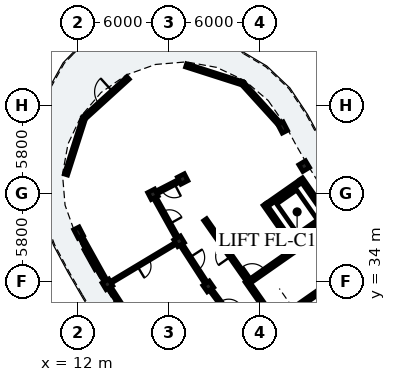
"""IFC4 building model, lengths in metres.
Left out: names, types, materials, properties, quantities, classifications, styles, units other than length and angle.
Written with IfcOpenShell. Run it as: python <this file> out.ifc"""

import sys

from ifc_helpers import new_model, si_unit, direction, frame, frame_2d, origin, origin_2d, place, context, subcontext, project, spatial, rectangle, extrude, element, fill, save


model = new_model("IFC4")
c1 = context("Model", 3, precision=1e-05, world=origin(), true_north=direction((0.0, 1.0)))
c2 = subcontext(c1, "Body", "Model", "MODEL_VIEW")
j1 = project(units=[si_unit("LENGTHUNIT", "METRE"), si_unit("PLANEANGLEUNIT", "RADIAN")], contexts=[c1])
p1 = place(None, origin())
s1 = spatial("IfcSite", under=j1, at=p1, CompositionType="ELEMENT")
p2 = place(p1, origin())
s2 = spatial("IfcBuilding", under=s1, at=p2, CompositionType="ELEMENT")
p3 = place(p2, frame((0.0, 0.0, 35.72)))
s3 = spatial("IfcBuildingStorey", under=s2, at=p3, CompositionType="ELEMENT", Elevation=35.72)
p4 = place(p3, frame((25.114, 31.414, 0.0), z_axis=(0.0, 0.0, 1.0), x_axis=(0.819141541656, 0.573591435374, 0.0)))
e1 = element("IfcWall", 1, at=p4, inside=s3, PredefinedType="SHEAR", context=c2, shape_type="SweptSolid", body=[
    extrude(rectangle(XDim=6.6, YDim=0.25, at=frame_2d((3.3, 0.0))), origin(), (0.0, 0.0, 1.0), 3.11),
])
p5 = place(p3, frame((25.083, 31.24, 0.0), z_axis=(0.0, 0.0, 1.0), x_axis=(-0.573582112484, 0.819148069789, 0.0)))
e2 = element("IfcWall", 2, at=p5, inside=s3, PredefinedType="SHEAR", context=c2, shape_type="SweptSolid", body=[
    extrude(rectangle(XDim=3.42, YDim=0.25, at=frame_2d((1.71, 0.0))), origin(), (0.0, 0.0, 1.0), 3.11),
])
p6 = place(p3, frame((23.296, 34.01, 0.0), z_axis=(0.0, 0.0, 1.0), x_axis=(0.819153711596, 0.573574055182, 0.0)))
e3 = element("IfcWall", 3, at=p6, inside=s3, PredefinedType="SHEAR", context=c2, shape_type="SweptSolid", body=[
    extrude(rectangle(XDim=6.6, YDim=0.25, at=frame_2d((3.3, 0.0))), origin(), (0.0, 0.0, 1.0), 3.11),
])
p7 = place(p6, frame((0.22, 0.0, 0.0)))
e4 = element("IfcOpeningElement", 4, at=p7, cuts=e3, PredefinedType="OPENING", context=c2, shape_type="SweptSolid", body=[
    extrude(rectangle(XDim=1.05, YDim=2.15, at=frame_2d((0.525, 1.075))), frame((0.0, 0.135, 0.0), z_axis=(0.0, -1.0, 0.0), x_axis=(1.0, 0.0, 0.0)), (0.0, 0.0, 1.0), 0.27),
])
p8 = place(p3, frame((26.169, 36.419, 0.0), z_axis=(0.0, 0.0, 1.0), x_axis=(-0.573582966431, 0.819147471839, 0.0)))
e5 = element("IfcWall", 5, at=p8, inside=s3, PredefinedType="SHEAR", context=c2, shape_type="SweptSolid", body=[
    extrude(rectangle(XDim=3.26, YDim=0.23, at=frame_2d((1.63, 0.0))), origin(), (0.0, 0.0, 1.0), 3.11),
])
p9 = place(p8, frame((0.9, 0.0, 0.0)))
e6 = element("IfcOpeningElement", 6, at=p9, cuts=e5, PredefinedType="OPENING", context=c2, shape_type="SweptSolid", body=[
    extrude(rectangle(XDim=1.1, YDim=2.15, at=frame_2d((0.55, 1.075))), frame((0.0, 0.125, 0.0), z_axis=(0.0, -1.0, 0.0), x_axis=(1.0, 0.0, 0.0)), (0.0, 0.0, 1.0), 0.25),
])
p10 = place(p3, frame((28.569, 38.1, 0.0), z_axis=(0.0, 0.0, 1.0), x_axis=(-0.573582966431, 0.819147471839, 0.0)))
e7 = element("IfcWall", 7, at=p10, inside=s3, PredefinedType="SHEAR", context=c2, shape_type="SweptSolid", body=[
    extrude(rectangle(XDim=3.26, YDim=0.23, at=frame_2d((1.63, 0.0))), origin(), (0.0, 0.0, 1.0), 3.11),
])
p11 = place(p3, frame((26.197, 36.579, 0.0), z_axis=(0.0, 0.0, 1.0), x_axis=(0.819159695432, 0.573565509231, 0.0)))
e8 = element("IfcWall", 8, at=p11, inside=s3, PredefinedType="SHEAR", context=c2, shape_type="SweptSolid", body=[
    extrude(rectangle(XDim=2.7, YDim=0.23, at=frame_2d((1.35, 0.0))), origin(), (0.0, 0.0, 1.0), 3.11),
])
p12 = place(p3, frame((24.459, 39.061, 0.0), z_axis=(0.0, 0.0, 1.0), x_axis=(0.819189439894, 0.573523026186, 0.0)))
e9 = element("IfcWall", 9, at=p12, inside=s3, PredefinedType="SHEAR", context=c2, shape_type="SweptSolid", body=[
    extrude(rectangle(XDim=2.7, YDim=0.23, at=frame_2d((1.35, 0.0))), origin(), (0.0, 0.0, 1.0), 3.11),
])
p13 = place(p3, frame((25.483, 44.147, 0.0), z_axis=(0.0, 0.0, 1.0), x_axis=(-0.889017141486, -0.457873915117, 0.0)))
e10 = element("IfcColumn", 10, at=p13, inside=s3, PredefinedType="PILASTER", context=c2, shape_type="SweptSolid", body=[
    extrude(rectangle(XDim=0.39, YDim=0.63, at=origin_2d()), origin(), (0.0, 0.0, 1.0), 3.125),
])
for number, where, z_axis, x_axis in (
    (11, (18.905, 40.759, 0.0), (0.0, 0.0, 1.0), (-0.889, -0.458, 0.0)),
    (12, (16.949, 39.752, 0.0), (0.0, 0.0, 1.0), (-0.889, -0.458, 0.0)),
):
    element("IfcColumn", number, at=place(p3, frame(where, z_axis=z_axis, x_axis=x_axis)), inside=s3, PredefinedType="COLUMN", context=c2, shape_type="SweptSolid", body=[
        extrude(rectangle(XDim=0.51, YDim=0.51, at=origin_2d()), origin(), (0.0, 0.0, 1.0), 3.125),
    ])
p14 = place(p3, frame((12.059, 37.234, 0.0), z_axis=(0.0, 0.0, 1.0), x_axis=(-0.889017141486, -0.457873915117, 0.0)))
e13 = element("IfcColumn", 13, at=p14, inside=s3, PredefinedType="PILASTER", context=c2, shape_type="SweptSolid", body=[
    extrude(rectangle(XDim=0.39, YDim=0.63, at=origin_2d()), origin(), (0.0, 0.0, 1.0), 3.125),
])
for number, where, z_axis, x_axis in (
    (14, (26.899, 41.606, 0.0), (0.0, 0.0, 1.0), (-0.857, -0.515, 0.0)),
    (15, (18.67, 36.662, 0.0), (0.0, 0.0, 1.0), (-0.857, -0.515, 0.0)),
    (16, (13.956, 33.83, 0.0), (0.0, 0.0, 1.0), (-0.857, -0.515, 0.0)),
    (17, (20.59, 33.692, 0.0), (0.0, 0.0, 1.0), (-0.822, -0.57, 0.0)),
):
    element("IfcColumn", number, at=place(p3, frame(where, z_axis=z_axis, x_axis=x_axis)), inside=s3, PredefinedType="COLUMN", context=c2, shape_type="SweptSolid", body=[
        extrude(rectangle(XDim=0.51, YDim=0.51, at=origin_2d()), origin(), (0.0, 0.0, 1.0), 3.125),
    ])
p15 = place(p3, frame((12.139, 37.089, 0.0), z_axis=(0.0, 0.0, 1.0), x_axis=(0.486730241133, -0.873552329495, 0.0)))
e18 = element("IfcWall", 18, at=p15, inside=s3, PredefinedType="SOLIDWALL", context=c2, shape_type="SweptSolid", body=[
    extrude(rectangle(XDim=3.507, YDim=0.22, at=frame_2d((1.753, 0.0))), origin(), (0.0, 0.0, 1.0), 2.355),
])
p16 = place(p15, frame((0.993, 0.0, 0.55)))
e19 = element("IfcOpeningElement", 19, at=p16, cuts=e18, PredefinedType="OPENING", context=c2, shape_type="SweptSolid", body=[
    extrude(rectangle(XDim=1.52, YDim=1.485, at=frame_2d((0.76, 0.743))), frame((0.0, 0.12, 0.0), z_axis=(0.0, -1.0, 0.0), x_axis=(1.0, 0.0, 0.0)), (0.0, 0.0, 1.0), 0.24),
])
p17 = place(p3, frame((14.078, 33.641, 0.0), z_axis=(0.0, 0.0, 1.0), x_axis=(0.542803784415, -0.839859542796, 0.0)))
e20 = element("IfcWall", 20, at=p17, inside=s3, PredefinedType="SOLIDWALL", context=c2, shape_type="SweptSolid", body=[
    extrude(rectangle(XDim=3.507, YDim=0.22, at=frame_2d((1.753, 0.0))), origin(), (0.0, 0.0, 1.0), 2.355),
])
p18 = place(p17, frame((0.933, 0.0, 0.55)))
e21 = element("IfcOpeningElement", 21, at=p18, cuts=e20, PredefinedType="OPENING", context=c2, shape_type="SweptSolid", body=[
    extrude(rectangle(XDim=1.64, YDim=1.56, at=frame_2d((0.82, 0.78))), frame((0.0, 0.12, 0.0), z_axis=(0.0, -1.0, 0.0), x_axis=(1.0, 0.0, 0.0)), (0.0, 0.0, 1.0), 0.24),
])
p19 = place(p3, frame((11.23, 41.053, 0.0), z_axis=(0.0, 0.0, 1.0), x_axis=(0.304848259057, 0.95240093393, 0.0)))
e22 = element("IfcWall", 22, at=p19, inside=s3, PredefinedType="SOLIDWALL", context=c2, shape_type="SweptSolid", body=[
    extrude(rectangle(XDim=3.908, YDim=0.22, at=frame_2d((1.954, 0.0))), origin(), (0.0, 0.0, 1.0), 2.355),
])
p20 = place(p19, frame((1.029, 0.0, 0.4)))
e23 = element("IfcOpeningElement", 23, at=p20, cuts=e22, PredefinedType="OPENING", context=c2, shape_type="SweptSolid", body=[
    extrude(rectangle(XDim=1.85, YDim=1.72, at=frame_2d((0.925, 0.86))), frame((0.0, 0.12, 0.0), z_axis=(0.0, -1.0, 0.0), x_axis=(1.0, 0.0, 0.0)), (0.0, 0.0, 1.0), 0.24),
])
p21 = place(p3, frame((12.421, 44.775, 0.0), z_axis=(0.0, 0.0, 1.0), x_axis=(0.740242444111, 0.672340035947, 0.0)))
e24 = element("IfcWall", 24, at=p21, inside=s3, PredefinedType="SOLIDWALL", context=c2, shape_type="SweptSolid", body=[
    extrude(rectangle(XDim=3.908, YDim=0.22, at=frame_2d((1.954, 0.0))), origin(), (0.0, 0.0, 1.0), 2.355),
])
p22 = place(p21, frame((1.354, 0.0, 0.0)))
e25 = element("IfcOpeningElement", 25, at=p22, cuts=e24, PredefinedType="OPENING", context=c2, shape_type="SweptSolid", body=[
    extrude(rectangle(XDim=1.2, YDim=2.15, at=frame_2d((0.6, 1.075))), frame((0.0, 0.12, 0.0), z_axis=(0.0, -1.0, 0.0), x_axis=(1.0, 0.0, 0.0)), (0.0, 0.0, 1.0), 0.24),
])
p23 = place(p3, frame((19.133, 48.232, 0.0), z_axis=(0.0, 0.0, 1.0), x_axis=(0.952382795507, -0.304904920954, 0.0)))
e26 = element("IfcWall", 26, at=p23, inside=s3, PredefinedType="SOLIDWALL", context=c2, shape_type="SweptSolid", body=[
    extrude(rectangle(XDim=3.908, YDim=0.22, at=frame_2d((1.954, 0.0))), origin(), (0.0, 0.0, 1.0), 2.355),
])
p24 = place(p23, frame((1.029, 0.0, 0.4)))
e27 = element("IfcOpeningElement", 27, at=p24, cuts=e26, PredefinedType="OPENING", context=c2, shape_type="SweptSolid", body=[
    extrude(rectangle(XDim=1.85, YDim=1.72, at=frame_2d((0.925, 0.86))), frame((0.0, 0.12, 0.0), z_axis=(0.0, -1.0, 0.0), x_axis=(1.0, 0.0, 0.0)), (0.0, 0.0, 1.0), 0.24),
])
p25 = place(p3, frame((22.855, 47.04, 0.0), z_axis=(0.0, 0.0, 1.0), x_axis=(0.672371126638, -0.740214204175, 0.0)))
e28 = element("IfcWall", 28, at=p25, inside=s3, PredefinedType="SOLIDWALL", context=c2, shape_type="SweptSolid", body=[
    extrude(rectangle(XDim=3.908, YDim=0.22, at=frame_2d((1.954, 0.0))), origin(), (0.0, 0.0, 1.0), 2.355),
])
p26 = place(p25, frame((0.979, 0.0, 0.4)))
e29 = element("IfcOpeningElement", 29, at=p26, cuts=e28, PredefinedType="OPENING", context=c2, shape_type="SweptSolid", body=[
    extrude(rectangle(XDim=1.95, YDim=1.78, at=frame_2d((0.975, 0.89))), frame((0.0, 0.12, 0.0), z_axis=(0.0, -1.0, 0.0), x_axis=(1.0, 0.0, 0.0)), (0.0, 0.0, 1.0), 0.24),
])
p27 = place(p3, frame((23.195, 34.068, 0.0), z_axis=(0.0, 0.0, 1.0), x_axis=(-0.573572687386, 0.819154669329, 0.0)))
e30 = element("IfcWall", 30, at=p27, inside=s3, PredefinedType="PARTITIONING", context=c2, shape_type="SweptSolid", body=[
    extrude(rectangle(XDim=4.9, YDim=0.22, at=frame_2d((2.45, 0.0))), origin(), (0.0, 0.0, 1.0), 2.34),
])
p28 = place(p27, frame((1.95, 0.0, 0.0)))
e31 = element("IfcOpeningElement", 31, at=p28, cuts=e30, PredefinedType="OPENING", context=c2, shape_type="SweptSolid", body=[
    extrude(rectangle(XDim=1.0, YDim=2.15, at=frame_2d((0.5, 1.075))), frame((0.0, 0.12, 0.0), z_axis=(0.0, -1.0, 0.0), x_axis=(1.0, 0.0, 0.0)), (0.0, 0.0, 1.0), 0.24),
])
p29 = place(p3, frame((17.119, 39.446, 0.0), z_axis=(0.0, 0.0, 1.0), x_axis=(0.48673124079, -0.8735517725, 0.0)))
e32 = element("IfcWall", 32, at=p29, inside=s3, PredefinedType="PARTITIONING", context=c2, shape_type="SweptSolid", body=[
    extrude(rectangle(XDim=2.837, YDim=0.195, at=frame_2d((1.418, 0.0))), origin(), (0.0, 0.0, 1.0), 2.37),
])
p30 = place(p29, frame((0.954, 0.0, 0.0)))
e33 = element("IfcOpeningElement", 33, at=p30, cuts=e32, PredefinedType="OPENING", context=c2, shape_type="SweptSolid", body=[
    extrude(rectangle(XDim=0.93, YDim=2.12, at=frame_2d((0.465, 1.06))), frame((0.0, 0.107, 0.0), z_axis=(0.0, -1.0, 0.0), x_axis=(1.0, 0.0, 0.0)), (0.0, 0.0, 1.0), 0.215),
])
p31 = place(p3, frame((18.327, 36.456, 0.0), z_axis=(0.0, 0.0, 1.0), x_axis=(-0.857139805444, -0.515083831937, 0.0)))
e34 = element("IfcWall", 34, at=p31, inside=s3, PredefinedType="PARTITIONING", context=c2, shape_type="SweptSolid", body=[
    extrude(rectangle(XDim=4.7, YDim=0.125, at=frame_2d((2.35, 0.0))), origin(), (0.0, 0.0, 1.0), 2.37),
])
p32 = place(p31, frame((1.905, 0.0, 0.0)))
e35 = element("IfcOpeningElement", 35, at=p32, cuts=e34, PredefinedType="OPENING", context=c2, shape_type="SweptSolid", body=[
    extrude(rectangle(XDim=0.89, YDim=2.1, at=frame_2d((0.445, 1.05))), frame((0.0, 0.073, 0.0), z_axis=(0.0, -1.0, 0.0), x_axis=(1.0, 0.0, 0.0)), (0.0, 0.0, 1.0), 0.145),
])
p33 = place(p3, frame((18.86, 36.368, 0.0), z_axis=(0.0, 0.0, 1.0), x_axis=(0.542787304957, -0.83987019329, 0.0)))
e36 = element("IfcWall", 36, at=p33, inside=s3, PredefinedType="PARTITIONING", context=c2, shape_type="SweptSolid", body=[
    extrude(rectangle(XDim=2.837, YDim=0.195, at=frame_2d((1.418, 0.0))), origin(), (0.0, 0.0, 1.0), 2.37),
])
p34 = place(p33, frame((0.924, 0.0, 0.0)))
e37 = element("IfcOpeningElement", 37, at=p34, cuts=e36, PredefinedType="OPENING", context=c2, shape_type="SweptSolid", body=[
    extrude(rectangle(XDim=0.99, YDim=2.16, at=frame_2d((0.495, 1.08))), frame((0.0, 0.107, 0.0), z_axis=(0.0, -1.0, 0.0), x_axis=(1.0, 0.0, 0.0)), (0.0, 0.0, 1.0), 0.215),
])
p35 = place(p3, frame((20.799, 33.411, 0.0), z_axis=(0.0, 0.0, 1.0), x_axis=(0.596552136601, -0.802574325727, 0.0)))
e38 = element("IfcWall", 38, at=p35, inside=s3, PredefinedType="PARTITIONING", context=c2, shape_type="SweptSolid", body=[
    extrude(rectangle(XDim=2.837, YDim=0.195, at=frame_2d((1.418, 0.0))), origin(), (0.0, 0.0, 1.0), 2.37),
])
p36 = place(p35, frame((0.934, 0.0, 0.0)))
e39 = element("IfcOpeningElement", 39, at=p36, cuts=e38, PredefinedType="OPENING", context=c2, shape_type="SweptSolid", body=[
    extrude(rectangle(XDim=0.97, YDim=2.15, at=frame_2d((0.485, 1.075))), frame((0.0, 0.107, 0.0), z_axis=(0.0, -1.0, 0.0), x_axis=(1.0, 0.0, 0.0)), (0.0, 0.0, 1.0), 0.215),
])
p37 = place(p3, frame((31.801, 34.344, 0.0), z_axis=(0.0, 0.0, 1.0), x_axis=(-0.74023124711, -0.672352363573, 0.0)))
e40 = element("IfcWall", 40, at=p37, inside=s3, PredefinedType="PARTITIONING", context=c2, shape_type="SweptSolid", body=[
    extrude(rectangle(XDim=6.6, YDim=0.125, at=frame_2d((3.3, 0.0))), origin(), (0.0, 0.0, 1.0), 2.37),
])
p38 = place(p37, frame((2.865, 0.0, 0.0)))
e41 = element("IfcOpeningElement", 41, at=p38, cuts=e40, PredefinedType="OPENING", context=c2, shape_type="SweptSolid", body=[
    extrude(rectangle(XDim=0.87, YDim=2.08, at=frame_2d((0.435, 1.04))), frame((0.0, 0.073, 0.0), z_axis=(0.0, -1.0, 0.0), x_axis=(1.0, 0.0, 0.0)), (0.0, 0.0, 1.0), 0.145),
])
p39 = place(p3, frame((18.86, 40.736, 0.0), z_axis=(0.0, 0.0, 1.0), x_axis=(-0.889039089533, -0.45783129784, 0.0)))
e42 = element("IfcWall", 42, at=p39, inside=s3, PredefinedType="PARTITIONING", context=c2, shape_type="SweptSolid", body=[
    extrude(rectangle(XDim=2.1, YDim=0.195, at=frame_2d((1.05, 0.0))), origin(), (0.0, 0.0, 1.0), 2.37),
])
p40 = place(p39, frame((0.57, 0.0, 0.0)))
e43 = element("IfcOpeningElement", 43, at=p40, cuts=e42, PredefinedType="OPENING", context=c2, shape_type="SweptSolid", body=[
    extrude(rectangle(XDim=0.95, YDim=2.13, at=frame_2d((0.475, 1.065))), frame((0.0, 0.107, 0.0), z_axis=(0.0, -1.0, 0.0), x_axis=(1.0, 0.0, 0.0)), (0.0, 0.0, 1.0), 0.215),
])
p41 = place(p16, origin())
e44 = element("IfcWindow", 44, at=p41, inside=s3, PartitioningType="SINGLE_PANEL", PredefinedType="WINDOW", context=c2, shape_type="SweptSolid", body=[
    extrude(rectangle(XDim=1.52, YDim=1.485, at=frame_2d((0.76, 0.743))), frame((0.0, 0.03, 0.0), z_axis=(0.0, -1.0, 0.0), x_axis=(1.0, 0.0, 0.0)), (0.0, 0.0, 1.0), 0.06),
])
fill(e19, e44)
p42 = place(p18, origin())
e45 = element("IfcWindow", 45, at=p42, inside=s3, PartitioningType="SINGLE_PANEL", PredefinedType="WINDOW", context=c2, shape_type="SweptSolid", body=[
    extrude(rectangle(XDim=1.64, YDim=1.56, at=frame_2d((0.82, 0.78))), frame((0.0, 0.03, 0.0), z_axis=(0.0, -1.0, 0.0), x_axis=(1.0, 0.0, 0.0)), (0.0, 0.0, 1.0), 0.06),
])
fill(e21, e45)
p43 = place(p20, origin())
e46 = element("IfcWindow", 46, at=p43, inside=s3, PartitioningType="SINGLE_PANEL", PredefinedType="WINDOW", context=c2, shape_type="SweptSolid", body=[
    extrude(rectangle(XDim=1.85, YDim=1.72, at=frame_2d((0.925, 0.86))), frame((0.0, 0.03, 0.0), z_axis=(0.0, -1.0, 0.0), x_axis=(1.0, 0.0, 0.0)), (0.0, 0.0, 1.0), 0.06),
])
fill(e23, e46)
p44 = place(p22, origin())
e47 = element("IfcDoor", 47, at=p44, inside=s3, OperationType="SINGLE_SWING_RIGHT", PredefinedType="DOOR", context=c2, shape_type="SweptSolid", body=[
    extrude(rectangle(XDim=1.2, YDim=2.15, at=frame_2d((0.6, 1.075))), frame((0.0, 0.025, 0.0), z_axis=(0.0, -1.0, 0.0), x_axis=(1.0, 0.0, 0.0)), (0.0, 0.0, 1.0), 0.05),
])
fill(e25, e47)
p45 = place(p24, origin())
e48 = element("IfcWindow", 48, at=p45, inside=s3, PartitioningType="SINGLE_PANEL", PredefinedType="WINDOW", context=c2, shape_type="SweptSolid", body=[
    extrude(rectangle(XDim=1.85, YDim=1.72, at=frame_2d((0.925, 0.86))), frame((0.0, 0.03, 0.0), z_axis=(0.0, -1.0, 0.0), x_axis=(1.0, 0.0, 0.0)), (0.0, 0.0, 1.0), 0.06),
])
fill(e27, e48)
p46 = place(p26, origin())
e49 = element("IfcWindow", 49, at=p46, inside=s3, PartitioningType="SINGLE_PANEL", PredefinedType="WINDOW", context=c2, shape_type="SweptSolid", body=[
    extrude(rectangle(XDim=1.95, YDim=1.78, at=frame_2d((0.975, 0.89))), frame((0.0, 0.03, 0.0), z_axis=(0.0, -1.0, 0.0), x_axis=(1.0, 0.0, 0.0)), (0.0, 0.0, 1.0), 0.06),
])
fill(e29, e49)
p47 = place(p7, origin())
e50 = element("IfcDoor", 50, at=p47, inside=s3, OperationType="SINGLE_SWING_LEFT", PredefinedType="DOOR", context=c2, shape_type="SweptSolid", body=[
    extrude(rectangle(XDim=1.05, YDim=2.15, at=frame_2d((0.525, 1.075))), frame((0.0, 0.025, 0.0), z_axis=(0.0, -1.0, 0.0), x_axis=(1.0, 0.0, 0.0)), (0.0, 0.0, 1.0), 0.05),
])
fill(e4, e50)
p48 = place(p9, origin())
e51 = element("IfcDoor", 51, at=p48, inside=s3, OperationType="DOUBLE_DOOR_SLIDING", PredefinedType="DOOR", context=c2, shape_type="SweptSolid", body=[
    extrude(rectangle(XDim=1.1, YDim=2.15, at=frame_2d((0.55, 1.075))), frame((0.0, 0.025, 0.0), z_axis=(0.0, -1.0, 0.0), x_axis=(1.0, 0.0, 0.0)), (0.0, 0.0, 1.0), 0.05),
])
fill(e6, e51)
p49 = place(p28, origin())
e52 = element("IfcDoor", 52, at=p49, inside=s3, OperationType="SINGLE_SWING_LEFT", PredefinedType="DOOR", context=c2, shape_type="SweptSolid", body=[
    extrude(rectangle(XDim=1.0, YDim=2.15, at=frame_2d((0.5, 1.075))), frame((0.0, 0.025, 0.0), z_axis=(0.0, -1.0, 0.0), x_axis=(1.0, 0.0, 0.0)), (0.0, 0.0, 1.0), 0.05),
])
fill(e31, e52)
p50 = place(p30, origin())
e53 = element("IfcDoor", 53, at=p50, inside=s3, OperationType="SINGLE_SWING_RIGHT", PredefinedType="DOOR", context=c2, shape_type="SweptSolid", body=[
    extrude(rectangle(XDim=0.93, YDim=2.12, at=frame_2d((0.465, 1.06))), frame((0.0, 0.025, 0.0), z_axis=(0.0, -1.0, 0.0), x_axis=(1.0, 0.0, 0.0)), (0.0, 0.0, 1.0), 0.05),
])
fill(e33, e53)
p51 = place(p32, origin())
e54 = element("IfcDoor", 54, at=p51, inside=s3, OperationType="SINGLE_SWING_RIGHT", PredefinedType="DOOR", context=c2, shape_type="SweptSolid", body=[
    extrude(rectangle(XDim=0.89, YDim=2.1, at=frame_2d((0.445, 1.05))), frame((0.0, 0.025, 0.0), z_axis=(0.0, -1.0, 0.0), x_axis=(1.0, 0.0, 0.0)), (0.0, 0.0, 1.0), 0.05),
])
fill(e35, e54)
p52 = place(p34, origin())
e55 = element("IfcDoor", 55, at=p52, inside=s3, OperationType="SINGLE_SWING_LEFT", PredefinedType="DOOR", context=c2, shape_type="SweptSolid", body=[
    extrude(rectangle(XDim=0.99, YDim=2.16, at=frame_2d((0.495, 1.08))), frame((0.0, 0.025, 0.0), z_axis=(0.0, -1.0, 0.0), x_axis=(1.0, 0.0, 0.0)), (0.0, 0.0, 1.0), 0.05),
])
fill(e37, e55)
p53 = place(p36, origin())
e56 = element("IfcDoor", 56, at=p53, inside=s3, OperationType="SINGLE_SWING_RIGHT", PredefinedType="DOOR", context=c2, shape_type="SweptSolid", body=[
    extrude(rectangle(XDim=0.97, YDim=2.15, at=frame_2d((0.485, 1.075))), frame((0.0, 0.025, 0.0), z_axis=(0.0, -1.0, 0.0), x_axis=(1.0, 0.0, 0.0)), (0.0, 0.0, 1.0), 0.05),
])
fill(e39, e56)
p54 = place(p40, origin())
e57 = element("IfcDoor", 57, at=p54, inside=s3, OperationType="SINGLE_SWING_LEFT", PredefinedType="DOOR", context=c2, shape_type="SweptSolid", body=[
    extrude(rectangle(XDim=0.95, YDim=2.13, at=frame_2d((0.475, 1.065))), frame((0.0, 0.025, 0.0), z_axis=(0.0, -1.0, 0.0), x_axis=(1.0, 0.0, 0.0)), (0.0, 0.0, 1.0), 0.05),
])
fill(e43, e57)
save(model, sys.argv[1])
